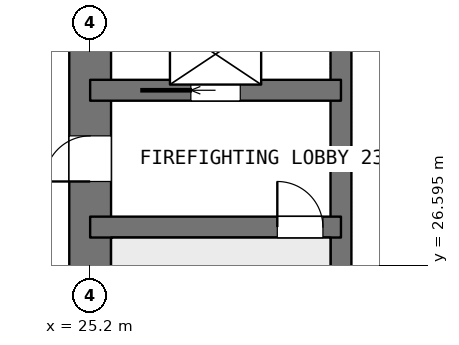
"""IFC4 building model, lengths in metres.
Left out: names, types, materials, properties, quantities, classifications, styles, units other than length and angle.
Written with IfcOpenShell. Run it as: python <this file> out.ifc"""

import sys

from ifc_helpers import new_model, si_unit, direction, frame, frame_2d, origin, place, context, subcontext, project, spatial, rectangle, extrude, element, fill, save


model = new_model("IFC4")
c1 = context("Model", 3, precision=1e-05, world=origin(), true_north=direction((0.0, 1.0)))
c2 = subcontext(c1, "Body", "Model", "MODEL_VIEW")
j1 = project(units=[si_unit("LENGTHUNIT", "METRE"), si_unit("PLANEANGLEUNIT", "RADIAN")], contexts=[c1])
p1 = place(None, origin())
s1 = spatial("IfcSite", under=j1, at=p1, CompositionType="ELEMENT")
p2 = place(p1, origin())
s2 = spatial("IfcBuilding", under=s1, at=p2, CompositionType="ELEMENT")
p3 = place(p2, frame((0.0, 0.0, 62.9)))
s3 = spatial("IfcBuildingStorey", under=s2, at=p3, CompositionType="ELEMENT", Elevation=62.9)
p4 = place(p3, frame((25.2, 21.0, 0.0), z_axis=(0.0, 0.0, 1.0), x_axis=(0.0, 1.0, 0.0)))
e1 = element("IfcWall", 1, at=p4, inside=s3, PredefinedType="SHEAR", context=c2, shape_type="SweptSolid", body=[
    extrude(rectangle(XDim=25.2, YDim=1.1, at=frame_2d((12.6, 0.0))), origin(), (0.0, 0.0, 1.0), 3.75),
])
p5 = place(p4, frame((7.8, 0.0, 0.0)))
e2 = element("IfcOpeningElement", 2, at=p5, cuts=e1, PredefinedType="OPENING", context=c2, shape_type="SweptSolid", body=[
    extrude(rectangle(XDim=1.2, YDim=2.1, at=frame_2d((0.6, 1.05))), frame((0.0, 0.56, 0.0), z_axis=(0.0, -1.0, 0.0), x_axis=(1.0, 0.0, 0.0)), (0.0, 0.0, 1.0), 1.12),
])
p6 = place(p4, frame((14.25, 0.0, 0.0)))
e3 = element("IfcOpeningElement", 3, at=p6, cuts=e1, PredefinedType="OPENING", context=c2, shape_type="SweptSolid", body=[
    extrude(rectangle(XDim=0.9, YDim=2.1, at=frame_2d((0.45, 1.05))), frame((0.0, 0.56, 0.0), z_axis=(0.0, -1.0, 0.0), x_axis=(1.0, 0.0, 0.0)), (0.0, 0.0, 1.0), 1.12),
])
p7 = place(p4, frame((16.85, 0.0, 0.0)))
e4 = element("IfcOpeningElement", 4, at=p7, cuts=e1, PredefinedType="OPENING", context=c2, shape_type="SweptSolid", body=[
    extrude(rectangle(XDim=0.9, YDim=2.1, at=frame_2d((0.45, 1.05))), frame((0.0, 0.56, 0.0), z_axis=(0.0, -1.0, 0.0), x_axis=(1.0, 0.0, 0.0)), (0.0, 0.0, 1.0), 1.12),
])
p8 = place(p4, frame((19.075, 0.0, 0.0)))
e5 = element("IfcOpeningElement", 5, at=p8, cuts=e1, PredefinedType="OPENING", context=c2, shape_type="SweptSolid", body=[
    extrude(rectangle(XDim=1.2, YDim=2.1, at=frame_2d((0.6, 1.05))), frame((0.0, 0.56, 0.0), z_axis=(0.0, -1.0, 0.0), x_axis=(1.0, 0.0, 0.0)), (0.0, 0.0, 1.0), 1.12),
])
p9 = place(p3, frame((31.8, 21.0, 0.0), z_axis=(0.0, 0.0, 1.0), x_axis=(0.0, 1.0, 0.0)))
e6 = element("IfcWall", 6, at=p9, inside=s3, PredefinedType="SHEAR", context=c2, shape_type="SweptSolid", body=[
    extrude(rectangle(XDim=25.2, YDim=0.55, at=frame_2d((12.6, 0.0))), origin(), (0.0, 0.0, 1.0), 3.75),
])
p10 = place(p3, frame((25.2, 27.6, 0.0), z_axis=(0.0, 0.0, 1.0), x_axis=(1.0, 0.0, 0.0)))
e7 = element("IfcWall", 7, at=p10, inside=s3, PredefinedType="SHEAR", context=c2, shape_type="SweptSolid", body=[
    extrude(rectangle(XDim=6.6, YDim=0.55, at=frame_2d((3.3, 0.0))), origin(), (0.0, 0.0, 1.0), 3.75),
])
p11 = place(p10, frame((4.925, 0.0, 0.0)))
e8 = element("IfcOpeningElement", 8, at=p11, cuts=e7, PredefinedType="OPENING", context=c2, shape_type="SweptSolid", body=[
    extrude(rectangle(XDim=1.2, YDim=2.1, at=frame_2d((0.6, 1.05))), frame((0.0, 0.285, 0.0), z_axis=(0.0, -1.0, 0.0), x_axis=(1.0, 0.0, 0.0)), (0.0, 0.0, 1.0), 0.57),
])
p12 = place(p3, frame((25.2, 31.2, 0.0), z_axis=(0.0, 0.0, 1.0), x_axis=(1.0, 0.0, 0.0)))
e9 = element("IfcWall", 9, at=p12, inside=s3, PredefinedType="SHEAR", context=c2, shape_type="SweptSolid", body=[
    extrude(rectangle(XDim=6.6, YDim=0.55, at=frame_2d((3.3, 0.0))), origin(), (0.0, 0.0, 1.0), 3.75),
])
p13 = place(p12, frame((2.65, 0.0, 0.0)))
e10 = element("IfcOpeningElement", 10, at=p13, cuts=e9, PredefinedType="OPENING", context=c2, shape_type="SweptSolid", body=[
    extrude(rectangle(XDim=1.3, YDim=2.1, at=frame_2d((0.65, 1.05))), frame((0.0, 0.285, 0.0), z_axis=(0.0, -1.0, 0.0), x_axis=(1.0, 0.0, 0.0)), (0.0, 0.0, 1.0), 0.57),
])
p14 = place(p3, frame((32.075, 29.4, 0.0), z_axis=(0.0, 0.0, 1.0), x_axis=(1.0, 0.0, 0.0)))
e11 = element("IfcWall", 11, at=p14, inside=s3, PredefinedType="PARTITIONING", context=c2, shape_type="SweptSolid", body=[
    extrude(rectangle(XDim=3.25, YDim=0.2, at=frame_2d((1.625, 0.0))), origin(), (0.0, 0.0, 1.0), 3.5),
])
p15 = place(p5, origin())
e12 = element("IfcDoor", 12, at=p15, inside=s3, OperationType="SINGLE_SWING_LEFT", PredefinedType="DOOR", context=c2, shape_type="SweptSolid", body=[
    extrude(rectangle(XDim=1.2, YDim=2.1, at=frame_2d((0.6, 1.05))), frame((0.0, 0.025, 0.0), z_axis=(0.0, -1.0, 0.0), x_axis=(1.0, 0.0, 0.0)), (0.0, 0.0, 1.0), 0.05),
])
fill(e2, e12)
p16 = place(p13, origin())
e13 = element("IfcDoor", 13, at=p16, inside=s3, OperationType="SLIDING_TO_LEFT", PredefinedType="USERDEFINED", context=c2, shape_type="SweptSolid", body=[
    extrude(rectangle(XDim=1.3, YDim=2.1, at=frame_2d((0.65, 1.05))), frame((0.0, 0.025, 0.0), z_axis=(0.0, -1.0, 0.0), x_axis=(1.0, 0.0, 0.0)), (0.0, 0.0, 1.0), 0.05),
])
fill(e10, e13)
p17 = place(p11, origin())
e14 = element("IfcDoor", 14, at=p17, inside=s3, OperationType="SINGLE_SWING_RIGHT", PredefinedType="DOOR", context=c2, shape_type="SweptSolid", body=[
    extrude(rectangle(XDim=1.2, YDim=2.1, at=frame_2d((0.6, 1.05))), frame((0.0, 0.025, 0.0), z_axis=(0.0, -1.0, 0.0), x_axis=(1.0, 0.0, 0.0)), (0.0, 0.0, 1.0), 0.05),
])
fill(e8, e14)
save(model, sys.argv[1])
